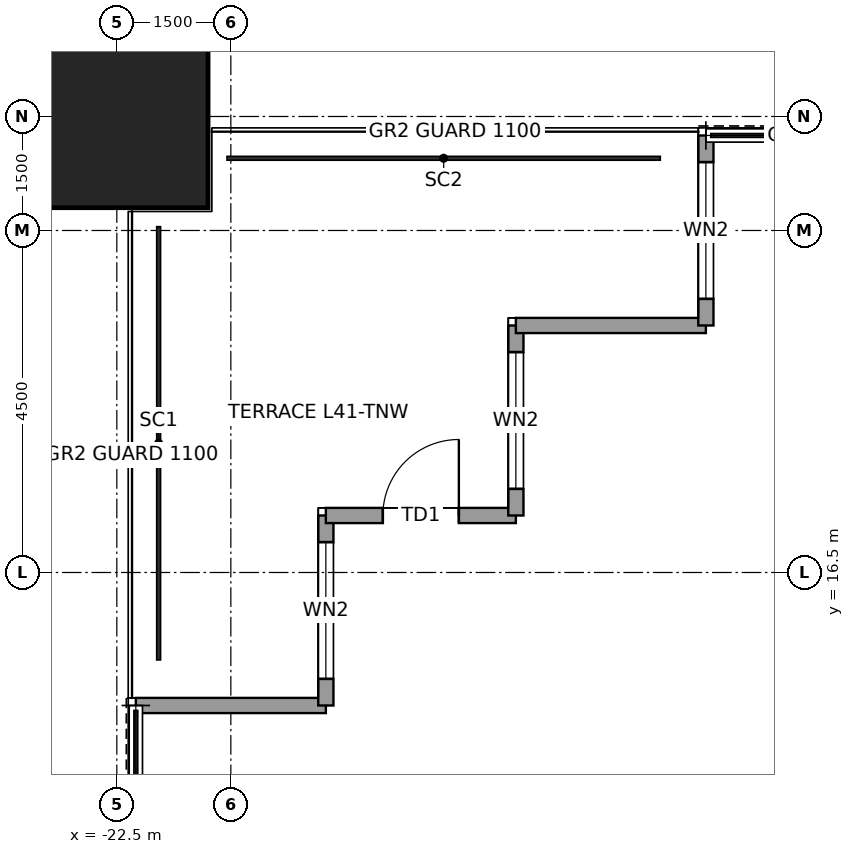
"""IFC4 building model, lengths in metres.
Left out: names, types, materials, properties, quantities, classifications, styles, units other than length and angle.
Written with IfcOpenShell. Run it as: python <this file> out.ifc"""

import sys

from ifc_helpers import new_model, si_unit, direction, frame, frame_2d, origin, origin_2d, place, context, subcontext, project, spatial, rectangle, hollow_rectangle, extrude, element, fill, save


model = new_model("IFC4")
c1 = context("Model", 3, precision=1e-05, world=origin(), true_north=direction((0.0, 1.0)))
c2 = subcontext(c1, "Body", "Model", "MODEL_VIEW")
j1 = project(units=[si_unit("LENGTHUNIT", "METRE"), si_unit("PLANEANGLEUNIT", "RADIAN")], contexts=[c1])
p1 = place(None, origin())
s1 = spatial("IfcSite", under=j1, at=p1, CompositionType="ELEMENT")
p2 = place(p1, origin())
s2 = spatial("IfcBuilding", under=s1, at=p2, CompositionType="ELEMENT")
p3 = place(p2, frame((0.0, 0.0, 197.9)))
s3 = spatial("IfcBuildingStorey", under=s2, at=p3, CompositionType="ELEMENT", Elevation=197.9)
p4 = place(p3, frame((-22.5, 22.5, 0.0), z_axis=(0.0, 0.0, 1.0), x_axis=(1.0, 0.0, 0.0)))
e1 = element("IfcColumn", 1, at=p4, inside=s3, PredefinedType="COLUMN", context=c2, shape_type="SweptSolid", body=[
    extrude(hollow_rectangle(XDim=2.4, YDim=2.4, WallThickness=0.12, at=origin_2d()), origin(), (0.0, 0.0, 1.0), 4.0),
])
p5 = place(p3, frame((-22.25, 14.75, 0.0), z_axis=(0.0, 0.0, 1.0), x_axis=(1.0, 0.0, 0.0)))
e2 = element("IfcWall", 2, at=p5, inside=s3, PredefinedType="SOLIDWALL", context=c2, shape_type="SweptSolid", body=[
    extrude(rectangle(XDim=2.5, YDim=0.2, at=frame_2d((1.25, 0.0))), origin(), (0.0, 0.0, 1.0), 3.85),
])
p6 = place(p3, frame((-19.75, 14.75, 0.0), z_axis=(0.0, 0.0, 1.0), x_axis=(0.0, 1.0, 0.0)))
e3 = element("IfcWall", 3, at=p6, inside=s3, PredefinedType="SOLIDWALL", context=c2, shape_type="SweptSolid", body=[
    extrude(rectangle(XDim=2.5, YDim=0.2, at=frame_2d((1.25, 0.0))), origin(), (0.0, 0.0, 1.0), 3.85),
])
p7 = place(p6, frame((0.35, 0.0, 0.3)))
e4 = element("IfcOpeningElement", 4, at=p7, cuts=e3, PredefinedType="OPENING", context=c2, shape_type="SweptSolid", body=[
    extrude(rectangle(XDim=1.8, YDim=2.4, at=frame_2d((0.9, 1.2))), frame((0.0, 0.11, 0.0), z_axis=(0.0, -1.0, 0.0), x_axis=(1.0, 0.0, 0.0)), (0.0, 0.0, 1.0), 0.22),
])
p8 = place(p3, frame((-19.75, 17.25, 0.0), z_axis=(0.0, 0.0, 1.0), x_axis=(1.0, 0.0, 0.0)))
e5 = element("IfcWall", 5, at=p8, inside=s3, PredefinedType="SOLIDWALL", context=c2, shape_type="SweptSolid", body=[
    extrude(rectangle(XDim=2.5, YDim=0.2, at=frame_2d((1.25, 0.0))), origin(), (0.0, 0.0, 1.0), 3.85),
])
p9 = place(p8, frame((0.75, 0.0, 0.0)))
e6 = element("IfcOpeningElement", 6, at=p9, cuts=e5, PredefinedType="OPENING", context=c2, shape_type="SweptSolid", body=[
    extrude(rectangle(XDim=1.0, YDim=2.4, at=frame_2d((0.5, 1.2))), frame((0.0, 0.11, 0.0), z_axis=(0.0, -1.0, 0.0), x_axis=(1.0, 0.0, 0.0)), (0.0, 0.0, 1.0), 0.22),
])
p10 = place(p3, frame((-17.25, 17.25, 0.0), z_axis=(0.0, 0.0, 1.0), x_axis=(0.0, 1.0, 0.0)))
e7 = element("IfcWall", 7, at=p10, inside=s3, PredefinedType="SOLIDWALL", context=c2, shape_type="SweptSolid", body=[
    extrude(rectangle(XDim=2.5, YDim=0.2, at=frame_2d((1.25, 0.0))), origin(), (0.0, 0.0, 1.0), 3.85),
])
p11 = place(p10, frame((0.35, 0.0, 0.3)))
e8 = element("IfcOpeningElement", 8, at=p11, cuts=e7, PredefinedType="OPENING", context=c2, shape_type="SweptSolid", body=[
    extrude(rectangle(XDim=1.8, YDim=2.4, at=frame_2d((0.9, 1.2))), frame((0.0, 0.11, 0.0), z_axis=(0.0, -1.0, 0.0), x_axis=(1.0, 0.0, 0.0)), (0.0, 0.0, 1.0), 0.22),
])
p12 = place(p3, frame((-17.25, 19.75, 0.0), z_axis=(0.0, 0.0, 1.0), x_axis=(1.0, 0.0, 0.0)))
e9 = element("IfcWall", 9, at=p12, inside=s3, PredefinedType="SOLIDWALL", context=c2, shape_type="SweptSolid", body=[
    extrude(rectangle(XDim=2.5, YDim=0.2, at=frame_2d((1.25, 0.0))), origin(), (0.0, 0.0, 1.0), 3.85),
])
p13 = place(p3, frame((-14.75, 19.75, 0.0), z_axis=(0.0, 0.0, 1.0), x_axis=(0.0, 1.0, 0.0)))
e10 = element("IfcWall", 10, at=p13, inside=s3, PredefinedType="SOLIDWALL", context=c2, shape_type="SweptSolid", body=[
    extrude(rectangle(XDim=2.5, YDim=0.2, at=frame_2d((1.25, 0.0))), origin(), (0.0, 0.0, 1.0), 3.85),
])
p14 = place(p13, frame((0.35, 0.0, 0.3)))
e11 = element("IfcOpeningElement", 11, at=p14, cuts=e10, PredefinedType="OPENING", context=c2, shape_type="SweptSolid", body=[
    extrude(rectangle(XDim=1.8, YDim=2.4, at=frame_2d((0.9, 1.2))), frame((0.0, 0.11, 0.0), z_axis=(0.0, -1.0, 0.0), x_axis=(1.0, 0.0, 0.0)), (0.0, 0.0, 1.0), 0.22),
])
p15 = place(p7, origin())
e12 = element("IfcWindow", 12, at=p15, inside=s3, PartitioningType="SINGLE_PANEL", PredefinedType="WINDOW", context=c2, shape_type="SweptSolid", body=[
    extrude(rectangle(XDim=1.8, YDim=2.4, at=frame_2d((0.9, 1.2))), frame((0.0, 0.03, 0.0), z_axis=(0.0, -1.0, 0.0), x_axis=(1.0, 0.0, 0.0)), (0.0, 0.0, 1.0), 0.06),
])
fill(e4, e12)
p16 = place(p9, origin())
e13 = element("IfcDoor", 13, at=p16, inside=s3, OperationType="SINGLE_SWING_RIGHT", PredefinedType="DOOR", context=c2, shape_type="SweptSolid", body=[
    extrude(rectangle(XDim=1.0, YDim=2.4, at=frame_2d((0.5, 1.2))), frame((0.0, 0.025, 0.0), z_axis=(0.0, -1.0, 0.0), x_axis=(1.0, 0.0, 0.0)), (0.0, 0.0, 1.0), 0.05),
])
fill(e6, e13)
p17 = place(p11, origin())
e14 = element("IfcWindow", 14, at=p17, inside=s3, PartitioningType="SINGLE_PANEL", PredefinedType="WINDOW", context=c2, shape_type="SweptSolid", body=[
    extrude(rectangle(XDim=1.8, YDim=2.4, at=frame_2d((0.9, 1.2))), frame((0.0, 0.03, 0.0), z_axis=(0.0, -1.0, 0.0), x_axis=(1.0, 0.0, 0.0)), (0.0, 0.0, 1.0), 0.06),
])
fill(e8, e14)
p18 = place(p14, origin())
e15 = element("IfcWindow", 15, at=p18, inside=s3, PartitioningType="SINGLE_PANEL", PredefinedType="WINDOW", context=c2, shape_type="SweptSolid", body=[
    extrude(rectangle(XDim=1.8, YDim=2.4, at=frame_2d((0.9, 1.2))), frame((0.0, 0.03, 0.0), z_axis=(0.0, -1.0, 0.0), x_axis=(1.0, 0.0, 0.0)), (0.0, 0.0, 1.0), 0.06),
])
fill(e11, e15)
save(model, sys.argv[1])
